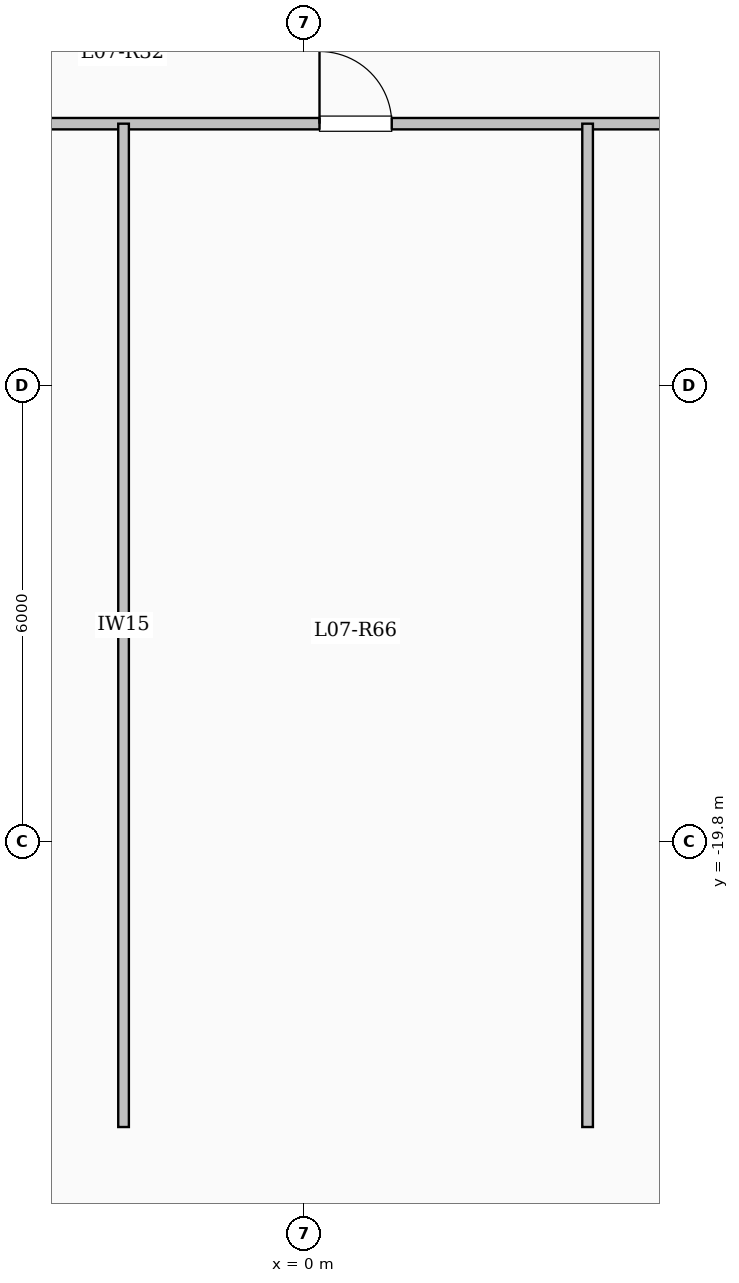
"""IFC4 building model, lengths in metres.
Left out: names, types, materials, properties, quantities, classifications, styles, units other than length and angle.
Written with IfcOpenShell. Run it as: python <this file> out.ifc"""

import sys

from ifc_helpers import new_model, si_unit, direction, frame, frame_2d, origin, place, context, subcontext, project, spatial, rectangle, extrude, element, fill, save


model = new_model("IFC4")
c1 = context("Model", 3, precision=1e-05, world=origin(), true_north=direction((0.0, 1.0)))
c2 = subcontext(c1, "Body", "Model", "MODEL_VIEW")
j1 = project(units=[si_unit("LENGTHUNIT", "METRE"), si_unit("PLANEANGLEUNIT", "RADIAN")], contexts=[c1])
p1 = place(None, origin())
s1 = spatial("IfcSite", under=j1, at=p1, CompositionType="ELEMENT")
p2 = place(p1, origin())
s2 = spatial("IfcBuilding", under=s1, at=p2, CompositionType="ELEMENT")
p3 = place(p2, frame((0.0, 0.0, 30.7)))
s3 = spatial("IfcBuildingStorey", under=s2, at=p3, CompositionType="ELEMENT", Elevation=30.7)
p4 = place(p3, frame((7.35, -23.55, 0.0), z_axis=(0.0, 0.0, 1.0), x_axis=(-0.894427191, -0.4472135955, 0.0)))
e1 = element("IfcWall", 1, at=p4, inside=s3, PredefinedType="SOLIDWALL", context=c2, shape_type="SweptSolid", body=[
    extrude(rectangle(XDim=3.354, YDim=0.3, at=frame_2d((1.677, 0.0))), origin(), (0.0, 0.0, 1.0), 3.1),
])
p5 = place(p4, frame((0.501, 0.0, 0.95)))
e2 = element("IfcOpeningElement", 2, at=p5, cuts=e1, PredefinedType="OPENING", context=c2, shape_type="SweptSolid", body=[
    extrude(rectangle(XDim=1.2, YDim=1.5, at=frame_2d((0.6, 0.75))), frame((0.0, 0.16, 0.0), z_axis=(0.0, -1.0, 0.0), x_axis=(1.0, 0.0, 0.0)), (0.0, 0.0, 1.0), 0.32),
])
p6 = place(p3, frame((-8.55, -10.35, 0.0), z_axis=(0.0, 0.0, 1.0), x_axis=(1.0, 0.0, 0.0)))
e3 = element("IfcWall", 3, at=p6, inside=s3, PredefinedType="PARTITIONING", context=c2, shape_type="SweptSolid", body=[
    extrude(rectangle(XDim=17.1, YDim=0.15, at=frame_2d((8.55, 0.0))), origin(), (0.0, 0.0, 1.0), 3.1),
])
p7 = place(p6, frame((2.618, 0.0, 0.0)))
e4 = element("IfcOpeningElement", 4, at=p7, cuts=e3, PredefinedType="OPENING", context=c2, shape_type="SweptSolid", body=[
    extrude(rectangle(XDim=0.95, YDim=2.15, at=frame_2d((0.475, 1.075))), frame((0.0, 0.085, 0.0), z_axis=(0.0, -1.0, 0.0), x_axis=(1.0, 0.0, 0.0)), (0.0, 0.0, 1.0), 0.17),
])
p8 = place(p6, frame((8.754, 0.0, 0.0)))
e5 = element("IfcOpeningElement", 5, at=p8, cuts=e3, PredefinedType="OPENING", context=c2, shape_type="SweptSolid", body=[
    extrude(rectangle(XDim=0.95, YDim=2.15, at=frame_2d((0.475, 1.075))), frame((0.0, 0.085, 0.0), z_axis=(0.0, -1.0, 0.0), x_axis=(1.0, 0.0, 0.0)), (0.0, 0.0, 1.0), 0.17),
])
p9 = place(p6, frame((14.211, 0.0, 0.0)))
e6 = element("IfcOpeningElement", 6, at=p9, cuts=e3, PredefinedType="OPENING", context=c2, shape_type="SweptSolid", body=[
    extrude(rectangle(XDim=0.95, YDim=2.15, at=frame_2d((0.475, 1.075))), frame((0.0, 0.085, 0.0), z_axis=(0.0, -1.0, 0.0), x_axis=(1.0, 0.0, 0.0)), (0.0, 0.0, 1.0), 0.17),
])
for number, where, z_axis, x_axis in (
    (7, (-2.374, -23.55, 0.0), (0.0, 0.0, 1.0), (0.0, 1.0, 0.0)),
    (8, (3.731, -23.55, 0.0), (0.0, 0.0, 1.0), (0.0, 1.0, 0.0)),
):
    element("IfcWall", number, at=place(p3, frame(where, z_axis=z_axis, x_axis=x_axis)), inside=s3, PredefinedType="PARTITIONING", context=c2, shape_type="SweptSolid", body=[
        extrude(rectangle(XDim=13.2, YDim=0.14, at=frame_2d((6.6, 0.0))), origin(), (0.0, 0.0, 1.0), 3.1),
    ])
p10 = place(p8, origin())
e9 = element("IfcDoor", 9, at=p10, inside=s3, OperationType="SINGLE_SWING_LEFT", PredefinedType="DOOR", context=c2, shape_type="SweptSolid", body=[
    extrude(rectangle(XDim=0.95, YDim=2.15, at=frame_2d((0.475, 1.075))), frame((0.0, 0.025, 0.0), z_axis=(0.0, -1.0, 0.0), x_axis=(1.0, 0.0, 0.0)), (0.0, 0.0, 1.0), 0.05),
])
fill(e5, e9)
save(model, sys.argv[1])
